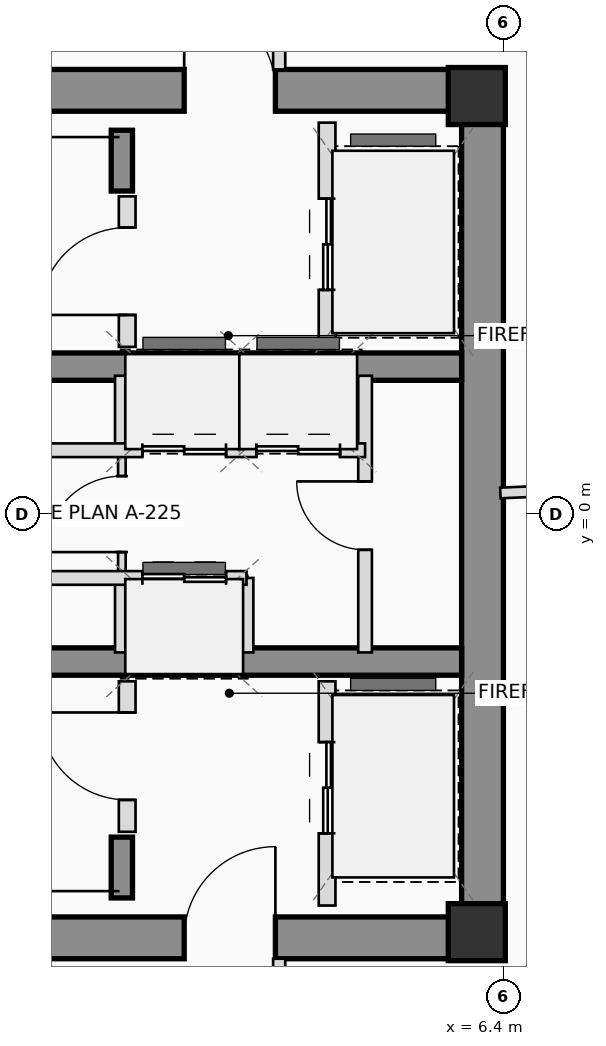
"""IFC4 building model, lengths in metres.
Left out: names, types, materials, properties, quantities, classifications, styles, units other than length and angle.
Written with IfcOpenShell. Run it as: python <this file> out.ifc"""

import sys

from ifc_helpers import new_model, si_unit, direction, frame, frame_2d, origin, origin_2d, place, context, subcontext, project, spatial, rectangle, extrude, source, transform, mapped, element, fill, save


model = new_model("IFC4")
c1 = context("Model", 3, precision=1e-05, world=origin(), true_north=direction((0.0, 1.0)))
c2 = subcontext(c1, "Body", "Model", "MODEL_VIEW")
j1 = project(units=[si_unit("LENGTHUNIT", "METRE"), si_unit("PLANEANGLEUNIT", "RADIAN")], contexts=[c1])
p1 = place(None, origin())
s1 = spatial("IfcSite", under=j1, at=p1, CompositionType="ELEMENT")
p2 = place(p1, origin())
s2 = spatial("IfcBuilding", under=s1, at=p2, CompositionType="ELEMENT")
p3 = place(p2, frame((0.0, 0.0, 277.95)))
s3 = spatial("IfcBuildingStorey", under=s2, at=p3, CompositionType="ELEMENT", Elevation=277.95)
m1 = source(origin(), c2, "Body", "SweptSolid", [
    extrude(rectangle(XDim=0.75, YDim=0.75, at=origin_2d()), origin(), (0.0, 0.0, 1.0), 3.4),
])
for number, where, z_axis, x_axis in (
    (1, (6.05, -5.5, 0.0), (0.0, 0.0, 1.0), (1.0, 0.0, 0.0)),
    (2, (6.05, 5.5, 0.0), (0.0, 0.0, 1.0), (1.0, 0.0, 0.0)),
):
    element("IfcColumn", number, at=place(p3, frame(where, z_axis=z_axis, x_axis=x_axis)), inside=s3, PredefinedType="COLUMN", context=c2, shape_type="MappedRepresentation", body=[
        mapped(m1, transform((0.0, 0.0, 0.0), scale=1.0)),
    ])
p4 = place(p3, frame((-6.4, 5.575, 0.0), z_axis=(0.0, 0.0, 1.0), x_axis=(1.0, 0.0, 0.0)))
e3 = element("IfcWall", 3, at=p4, inside=s3, PredefinedType="SHEAR", context=c2, shape_type="SweptSolid", body=[
    extrude(rectangle(XDim=12.8, YDim=0.55, at=frame_2d((6.4, 0.0))), origin(), (0.0, 0.0, 1.0), 3.4),
])
p5 = place(p4, frame((8.6, 0.0, 0.0)))
e4 = element("IfcOpeningElement", 4, at=p5, cuts=e3, PredefinedType="OPENING", context=c2, shape_type="SweptSolid", body=[
    extrude(rectangle(XDim=1.2, YDim=2.2, at=frame_2d((0.6, 1.1))), frame((0.0, 0.285, 0.0), z_axis=(0.0, -1.0, 0.0), x_axis=(1.0, 0.0, 0.0)), (0.0, 0.0, 1.0), 0.57),
])
p6 = place(p3, frame((-6.4, -5.575, 0.0), z_axis=(0.0, 0.0, 1.0), x_axis=(1.0, 0.0, 0.0)))
e5 = element("IfcWall", 5, at=p6, inside=s3, PredefinedType="SHEAR", context=c2, shape_type="SweptSolid", body=[
    extrude(rectangle(XDim=12.8, YDim=0.55, at=frame_2d((6.4, 0.0))), origin(), (0.0, 0.0, 1.0), 3.4),
])
p7 = place(p6, frame((8.6, 0.0, 0.0)))
e6 = element("IfcOpeningElement", 6, at=p7, cuts=e5, PredefinedType="OPENING", context=c2, shape_type="SweptSolid", body=[
    extrude(rectangle(XDim=1.2, YDim=2.2, at=frame_2d((0.6, 1.1))), frame((0.0, 0.285, 0.0), z_axis=(0.0, -1.0, 0.0), x_axis=(1.0, 0.0, 0.0)), (0.0, 0.0, 1.0), 0.57),
])
p8 = place(p3, frame((6.125, -5.3, 0.0), z_axis=(0.0, 0.0, 1.0), x_axis=(0.0, 1.0, 0.0)))
e7 = element("IfcWall", 7, at=p8, inside=s3, PredefinedType="SHEAR", context=c2, shape_type="SweptSolid", body=[
    extrude(rectangle(XDim=10.6, YDim=0.55, at=frame_2d((5.3, 0.0))), origin(), (0.0, 0.0, 1.0), 3.4),
])
for number, where, z_axis, x_axis in (
    (8, (-5.85, 1.94, 0.0), (0.0, 0.0, 1.0), (1.0, 0.0, 0.0)),
    (9, (-5.85, -1.94, 0.0), (0.0, 0.0, 1.0), (1.0, 0.0, 0.0)),
):
    element("IfcWall", number, at=place(p3, frame(where, z_axis=z_axis, x_axis=x_axis)), inside=s3, PredefinedType="SHEAR", context=c2, shape_type="SweptSolid", body=[
        extrude(rectangle(XDim=11.7, YDim=0.36, at=frame_2d((5.85, 0.0))), origin(), (0.0, 0.0, 1.0), 3.4),
    ])
for number, where, z_axis, x_axis in (
    (10, (1.38, 4.25, 0.0), (0.0, 0.0, 1.0), (0.0, 1.0, 0.0)),
    (11, (1.38, -5.05, 0.0), (0.0, 0.0, 1.0), (0.0, 1.0, 0.0)),
):
    element("IfcWall", number, at=place(p3, frame(where, z_axis=z_axis, x_axis=x_axis)), inside=s3, PredefinedType="SHEAR", context=c2, shape_type="SweptSolid", body=[
        extrude(rectangle(XDim=0.8, YDim=0.28, at=frame_2d((0.4, 0.0))), origin(), (0.0, 0.0, 1.0), 3.4),
    ])
p9 = place(p3, frame((1.45, 2.2, 0.0), z_axis=(0.0, 0.0, 1.0), x_axis=(0.0, 1.0, 0.0)))
e12 = element("IfcWall", 12, at=p9, inside=s3, PredefinedType="PLUMBINGWALL", context=c2, shape_type="SweptSolid", body=[
    extrude(rectangle(XDim=1.98, YDim=0.22, at=frame_2d((0.99, 0.0))), origin(), (0.0, 0.0, 1.0), 3.2),
])
p10 = place(p9, frame((0.42, 0.0, 0.0)))
e13 = element("IfcOpeningElement", 13, at=p10, cuts=e12, PredefinedType="OPENING", context=c2, shape_type="SweptSolid", body=[
    extrude(rectangle(XDim=1.15, YDim=2.15, at=frame_2d((0.575, 1.075))), frame((0.0, 0.12, 0.0), z_axis=(0.0, -1.0, 0.0), x_axis=(1.0, 0.0, 0.0)), (0.0, 0.0, 1.0), 0.24),
])
p11 = place(p3, frame((4.08, 2.2, 0.0), z_axis=(0.0, 0.0, 1.0), x_axis=(0.0, 1.0, 0.0)))
e14 = element("IfcWall", 14, at=p11, inside=s3, PredefinedType="PLUMBINGWALL", context=c2, shape_type="SweptSolid", body=[
    extrude(rectangle(XDim=2.95, YDim=0.22, at=frame_2d((1.475, 0.0))), origin(), (0.0, 0.0, 1.0), 3.2),
])
p12 = place(p11, frame((0.75, 0.0, 0.0)))
e15 = element("IfcOpeningElement", 15, at=p12, cuts=e14, PredefinedType="OPENING", context=c2, shape_type="SweptSolid", body=[
    extrude(rectangle(XDim=1.2, YDim=2.25, at=frame_2d((0.6, 1.125))), frame((0.0, 0.12, 0.0), z_axis=(0.0, -1.0, 0.0), x_axis=(1.0, 0.0, 0.0)), (0.0, 0.0, 1.0), 0.24),
])
p13 = place(p3, frame((1.45, -4.18, 0.0), z_axis=(0.0, 0.0, 1.0), x_axis=(0.0, 1.0, 0.0)))
e16 = element("IfcWall", 16, at=p13, inside=s3, PredefinedType="PLUMBINGWALL", context=c2, shape_type="SweptSolid", body=[
    extrude(rectangle(XDim=1.98, YDim=0.22, at=frame_2d((0.99, 0.0))), origin(), (0.0, 0.0, 1.0), 3.2),
])
p14 = place(p13, frame((0.42, 0.0, 0.0)))
e17 = element("IfcOpeningElement", 17, at=p14, cuts=e16, PredefinedType="OPENING", context=c2, shape_type="SweptSolid", body=[
    extrude(rectangle(XDim=1.15, YDim=2.15, at=frame_2d((0.575, 1.075))), frame((0.0, 0.12, 0.0), z_axis=(0.0, -1.0, 0.0), x_axis=(1.0, 0.0, 0.0)), (0.0, 0.0, 1.0), 0.24),
])
p15 = place(p3, frame((4.08, -5.15, 0.0), z_axis=(0.0, 0.0, 1.0), x_axis=(0.0, 1.0, 0.0)))
e18 = element("IfcWall", 18, at=p15, inside=s3, PredefinedType="PLUMBINGWALL", context=c2, shape_type="SweptSolid", body=[
    extrude(rectangle(XDim=2.95, YDim=0.22, at=frame_2d((1.475, 0.0))), origin(), (0.0, 0.0, 1.0), 3.2),
])
p16 = place(p15, frame((0.95, 0.0, 0.0)))
e19 = element("IfcOpeningElement", 19, at=p16, cuts=e18, PredefinedType="OPENING", context=c2, shape_type="SweptSolid", body=[
    extrude(rectangle(XDim=1.2, YDim=2.25, at=frame_2d((0.6, 1.125))), frame((0.0, 0.12, 0.0), z_axis=(0.0, -1.0, 0.0), x_axis=(1.0, 0.0, 0.0)), (0.0, 0.0, 1.0), 0.24),
])
p17 = place(p3, frame((1.38, -0.84, 0.0), z_axis=(0.0, 0.0, 1.0), x_axis=(0.0, 1.0, 0.0)))
e20 = element("IfcWall", 20, at=p17, inside=s3, PredefinedType="PARTITIONING", context=c2, shape_type="SweptSolid", body=[
    extrude(rectangle(XDim=1.68, YDim=0.1, at=frame_2d((0.84, 0.0))), origin(), (0.0, 0.0, 1.0), 3.2),
])
p18 = place(p17, frame((0.34, 0.0, 0.0)))
e21 = element("IfcOpeningElement", 21, at=p18, cuts=e20, PredefinedType="OPENING", context=c2, shape_type="SweptSolid", body=[
    extrude(rectangle(XDim=1.0, YDim=2.25, at=frame_2d((0.5, 1.125))), frame((0.0, 0.06, 0.0), z_axis=(0.0, -1.0, 0.0), x_axis=(1.0, 0.0, 0.0)), (0.0, 0.0, 1.0), 0.12),
])
for number, where, z_axis, x_axis in (
    (22, (1.38, 0.84, 0.0), (0.0, 0.0, 1.0), (0.0, 1.0, 0.0)),
    (23, (1.38, -1.82, 0.0), (0.0, 0.0, 1.0), (0.0, 1.0, 0.0)),
    (24, (3.02, 0.84, 0.0), (0.0, 0.0, 1.0), (0.0, 1.0, 0.0)),
    (25, (4.38, 0.84, 0.0), (0.0, 0.0, 1.0), (0.0, 1.0, 0.0)),
    (26, (3.02, -1.82, 0.0), (0.0, 0.0, 1.0), (0.0, 1.0, 0.0)),
):
    element("IfcWall", number, at=place(p3, frame(where, z_axis=z_axis, x_axis=x_axis)), inside=s3, PredefinedType="PLUMBINGWALL", context=c2, shape_type="SweptSolid", body=[
        extrude(rectangle(XDim=0.98, YDim=0.18, at=frame_2d((0.49, 0.0))), origin(), (0.0, 0.0, 1.0), 3.2),
    ])
p19 = place(p3, frame((4.58, -1.82, 0.0), z_axis=(0.0, 0.0, 1.0), x_axis=(0.0, 1.0, 0.0)))
e27 = element("IfcWall", 27, at=p19, inside=s3, PredefinedType="PLUMBINGWALL", context=c2, shape_type="SweptSolid", body=[
    extrude(rectangle(XDim=3.64, YDim=0.18, at=frame_2d((1.82, 0.0))), origin(), (0.0, 0.0, 1.0), 3.2),
])
p20 = place(p19, frame((1.35, 0.0, 0.0)))
e28 = element("IfcOpeningElement", 28, at=p20, cuts=e27, PredefinedType="OPENING", context=c2, shape_type="SweptSolid", body=[
    extrude(rectangle(XDim=0.9, YDim=2.05, at=frame_2d((0.45, 1.025))), frame((0.0, 0.1, 0.0), z_axis=(0.0, -1.0, 0.0), x_axis=(1.0, 0.0, 0.0)), (0.0, 0.0, 1.0), 0.2),
])
p21 = place(p3, frame((-5.68, 0.84, 0.0), z_axis=(0.0, 0.0, 1.0), x_axis=(1.0, 0.0, 0.0)))
e29 = element("IfcWall", 29, at=p21, inside=s3, PredefinedType="PLUMBINGWALL", context=c2, shape_type="SweptSolid", body=[
    extrude(rectangle(XDim=10.26, YDim=0.18, at=frame_2d((5.13, 0.0))), origin(), (0.0, 0.0, 1.0), 3.2),
])
p22 = place(p21, frame((0.91, 0.0, 0.0)))
e30 = element("IfcOpeningElement", 30, at=p22, cuts=e29, PredefinedType="OPENING", context=c2, shape_type="SweptSolid", body=[
    extrude(rectangle(XDim=0.9, YDim=2.05, at=frame_2d((0.45, 1.025))), frame((0.0, 0.1, 0.0), z_axis=(0.0, -1.0, 0.0), x_axis=(1.0, 0.0, 0.0)), (0.0, 0.0, 1.0), 0.2),
])
p23 = place(p21, frame((4.38, 0.0, 0.0)))
e31 = element("IfcOpeningElement", 31, at=p23, cuts=e29, PredefinedType="OPENING", context=c2, shape_type="SweptSolid", body=[
    extrude(rectangle(XDim=0.9, YDim=2.05, at=frame_2d((0.45, 1.025))), frame((0.0, 0.1, 0.0), z_axis=(0.0, -1.0, 0.0), x_axis=(1.0, 0.0, 0.0)), (0.0, 0.0, 1.0), 0.2),
])
p24 = place(p21, frame((7.33, 0.0, 0.0)))
e32 = element("IfcOpeningElement", 32, at=p24, cuts=e29, PredefinedType="OPENING", context=c2, shape_type="SweptSolid", body=[
    extrude(rectangle(XDim=1.1, YDim=2.2, at=frame_2d((0.55, 1.1))), frame((0.0, 0.1, 0.0), z_axis=(0.0, -1.0, 0.0), x_axis=(1.0, 0.0, 0.0)), (0.0, 0.0, 1.0), 0.2),
])
p25 = place(p21, frame((8.83, 0.0, 0.0)))
e33 = element("IfcOpeningElement", 33, at=p25, cuts=e29, PredefinedType="OPENING", context=c2, shape_type="SweptSolid", body=[
    extrude(rectangle(XDim=1.1, YDim=2.2, at=frame_2d((0.55, 1.1))), frame((0.0, 0.1, 0.0), z_axis=(0.0, -1.0, 0.0), x_axis=(1.0, 0.0, 0.0)), (0.0, 0.0, 1.0), 0.2),
])
p26 = place(p3, frame((-5.68, -0.84, 0.0), z_axis=(0.0, 0.0, 1.0), x_axis=(1.0, 0.0, 0.0)))
e34 = element("IfcWall", 34, at=p26, inside=s3, PredefinedType="PLUMBINGWALL", context=c2, shape_type="SweptSolid", body=[
    extrude(rectangle(XDim=8.7, YDim=0.18, at=frame_2d((4.35, 0.0))), origin(), (0.0, 0.0, 1.0), 3.2),
])
p27 = place(p26, frame((3.13, 0.0, 0.0)))
e35 = element("IfcOpeningElement", 35, at=p27, cuts=e34, PredefinedType="OPENING", context=c2, shape_type="SweptSolid", body=[
    extrude(rectangle(XDim=0.9, YDim=2.05, at=frame_2d((0.45, 1.025))), frame((0.0, 0.1, 0.0), z_axis=(0.0, -1.0, 0.0), x_axis=(1.0, 0.0, 0.0)), (0.0, 0.0, 1.0), 0.2),
])
p28 = place(p26, frame((7.33, 0.0, 0.0)))
e36 = element("IfcOpeningElement", 36, at=p28, cuts=e34, PredefinedType="OPENING", context=c2, shape_type="SweptSolid", body=[
    extrude(rectangle(XDim=1.1, YDim=2.2, at=frame_2d((0.55, 1.1))), frame((0.0, 0.1, 0.0), z_axis=(0.0, -1.0, 0.0), x_axis=(1.0, 0.0, 0.0)), (0.0, 0.0, 1.0), 0.2),
])
p29 = place(p3, frame((3.45, 7.49, 0.0), z_axis=(0.0, 0.0, 1.0), x_axis=(0.0, -1.0, 0.0)))
e37 = element("IfcWall", 37, at=p29, inside=s3, PredefinedType="PARTITIONING", context=c2, shape_type="SweptSolid", body=[
    extrude(rectangle(XDim=1.64, YDim=0.16, at=frame_2d((0.82, 0.0))), origin(), (0.0, 0.0, 1.0), 2.805),
])
p30 = place(p3, frame((3.45, -5.85, 0.0), z_axis=(0.0, 0.0, 1.0), x_axis=(0.0, -1.0, 0.0)))
e38 = element("IfcWall", 38, at=p30, inside=s3, PredefinedType="PARTITIONING", context=c2, shape_type="SweptSolid", body=[
    extrude(rectangle(XDim=1.64, YDim=0.16, at=frame_2d((0.82, 0.0))), origin(), (0.0, 0.0, 1.0), 3.2),
])
p31 = place(p30, frame((0.32, 0.0, 0.0)))
e39 = element("IfcOpeningElement", 39, at=p31, cuts=e38, PredefinedType="OPENING", context=c2, shape_type="SweptSolid", body=[
    extrude(rectangle(XDim=1.0, YDim=2.25, at=frame_2d((0.5, 1.125))), frame((0.0, 0.09, 0.0), z_axis=(0.0, -1.0, 0.0), x_axis=(1.0, 0.0, 0.0)), (0.0, 0.0, 1.0), 0.18),
])
p32 = place(p3, frame((6.36, 0.278, 0.0), z_axis=(0.0, 0.0, 1.0), x_axis=(0.999047617824, 0.043633213494, 0.0)))
e40 = element("IfcWall", 40, at=p32, inside=s3, PredefinedType="PARTITIONING", context=c2, shape_type="SweptSolid", body=[
    extrude(rectangle(XDim=13.406, YDim=0.14, at=frame_2d((6.703, 0.0))), origin(), (0.0, 0.0, 1.0), 2.605),
])
p33 = place(p5, origin())
e41 = element("IfcDoor", 41, at=p33, inside=s3, OperationType="SINGLE_SWING_LEFT", PredefinedType="DOOR", context=c2, shape_type="SweptSolid", body=[
    extrude(rectangle(XDim=1.2, YDim=2.2, at=frame_2d((0.6, 1.1))), frame((0.0, 0.025, 0.0), z_axis=(0.0, -1.0, 0.0), x_axis=(1.0, 0.0, 0.0)), (0.0, 0.0, 1.0), 0.05),
])
fill(e4, e41)
p34 = place(p7, origin())
e42 = element("IfcDoor", 42, at=p34, inside=s3, OperationType="SINGLE_SWING_RIGHT", PredefinedType="DOOR", context=c2, shape_type="SweptSolid", body=[
    extrude(rectangle(XDim=1.2, YDim=2.2, at=frame_2d((0.6, 1.1))), frame((0.0, 0.025, 0.0), z_axis=(0.0, -1.0, 0.0), x_axis=(1.0, 0.0, 0.0)), (0.0, 0.0, 1.0), 0.05),
])
fill(e6, e42)
p35 = place(p10, origin())
e43 = element("IfcDoor", 43, at=p35, inside=s3, OperationType="SINGLE_SWING_LEFT", PredefinedType="DOOR", context=c2, shape_type="SweptSolid", body=[
    extrude(rectangle(XDim=1.15, YDim=2.15, at=frame_2d((0.575, 1.075))), frame((0.0, 0.025, 0.0), z_axis=(0.0, -1.0, 0.0), x_axis=(1.0, 0.0, 0.0)), (0.0, 0.0, 1.0), 0.05),
])
fill(e13, e43)
p36 = place(p12, origin())
e44 = element("IfcDoor", 44, at=p36, inside=s3, OperationType="DOUBLE_DOOR_SLIDING", PredefinedType="DOOR", context=c2, shape_type="SweptSolid", body=[
    extrude(rectangle(XDim=1.2, YDim=2.25, at=frame_2d((0.6, 1.125))), frame((0.0, 0.025, 0.0), z_axis=(0.0, -1.0, 0.0), x_axis=(1.0, 0.0, 0.0)), (0.0, 0.0, 1.0), 0.05),
])
fill(e15, e44)
p37 = place(p14, origin())
e45 = element("IfcDoor", 45, at=p37, inside=s3, OperationType="SINGLE_SWING_RIGHT", PredefinedType="DOOR", context=c2, shape_type="SweptSolid", body=[
    extrude(rectangle(XDim=1.15, YDim=2.15, at=frame_2d((0.575, 1.075))), frame((0.0, 0.025, 0.0), z_axis=(0.0, -1.0, 0.0), x_axis=(1.0, 0.0, 0.0)), (0.0, 0.0, 1.0), 0.05),
])
fill(e17, e45)
p38 = place(p16, origin())
e46 = element("IfcDoor", 46, at=p38, inside=s3, OperationType="DOUBLE_DOOR_SLIDING", PredefinedType="DOOR", context=c2, shape_type="SweptSolid", body=[
    extrude(rectangle(XDim=1.2, YDim=2.25, at=frame_2d((0.6, 1.125))), frame((0.0, 0.025, 0.0), z_axis=(0.0, -1.0, 0.0), x_axis=(1.0, 0.0, 0.0)), (0.0, 0.0, 1.0), 0.05),
])
fill(e19, e46)
p39 = place(p18, origin())
e47 = element("IfcDoor", 47, at=p39, inside=s3, OperationType="SINGLE_SWING_LEFT", PredefinedType="DOOR", context=c2, shape_type="SweptSolid", body=[
    extrude(rectangle(XDim=1.0, YDim=2.25, at=frame_2d((0.5, 1.125))), frame((0.0, 0.025, 0.0), z_axis=(0.0, -1.0, 0.0), x_axis=(1.0, 0.0, 0.0)), (0.0, 0.0, 1.0), 0.05),
])
fill(e21, e47)
p40 = place(p20, origin())
e48 = element("IfcDoor", 48, at=p40, inside=s3, OperationType="SINGLE_SWING_RIGHT", PredefinedType="DOOR", context=c2, shape_type="SweptSolid", body=[
    extrude(rectangle(XDim=0.9, YDim=2.05, at=frame_2d((0.45, 1.025))), frame((0.0, 0.025, 0.0), z_axis=(0.0, -1.0, 0.0), x_axis=(1.0, 0.0, 0.0)), (0.0, 0.0, 1.0), 0.05),
])
fill(e28, e48)
p41 = place(p24, origin())
e49 = element("IfcDoor", 49, at=p41, inside=s3, OperationType="DOUBLE_DOOR_SLIDING", PredefinedType="DOOR", context=c2, shape_type="SweptSolid", body=[
    extrude(rectangle(XDim=1.1, YDim=2.2, at=frame_2d((0.55, 1.1))), frame((0.0, 0.025, 0.0), z_axis=(0.0, -1.0, 0.0), x_axis=(1.0, 0.0, 0.0)), (0.0, 0.0, 1.0), 0.05),
])
fill(e32, e49)
p42 = place(p25, origin())
e50 = element("IfcDoor", 50, at=p42, inside=s3, OperationType="DOUBLE_DOOR_SLIDING", PredefinedType="DOOR", context=c2, shape_type="SweptSolid", body=[
    extrude(rectangle(XDim=1.1, YDim=2.2, at=frame_2d((0.55, 1.1))), frame((0.0, 0.025, 0.0), z_axis=(0.0, -1.0, 0.0), x_axis=(1.0, 0.0, 0.0)), (0.0, 0.0, 1.0), 0.05),
])
fill(e33, e50)
p43 = place(p28, origin())
e51 = element("IfcDoor", 51, at=p43, inside=s3, OperationType="DOUBLE_DOOR_SLIDING", PredefinedType="DOOR", context=c2, shape_type="SweptSolid", body=[
    extrude(rectangle(XDim=1.1, YDim=2.2, at=frame_2d((0.55, 1.1))), frame((0.0, 0.025, 0.0), z_axis=(0.0, -1.0, 0.0), x_axis=(1.0, 0.0, 0.0)), (0.0, 0.0, 1.0), 0.05),
])
fill(e36, e51)
save(model, sys.argv[1])
